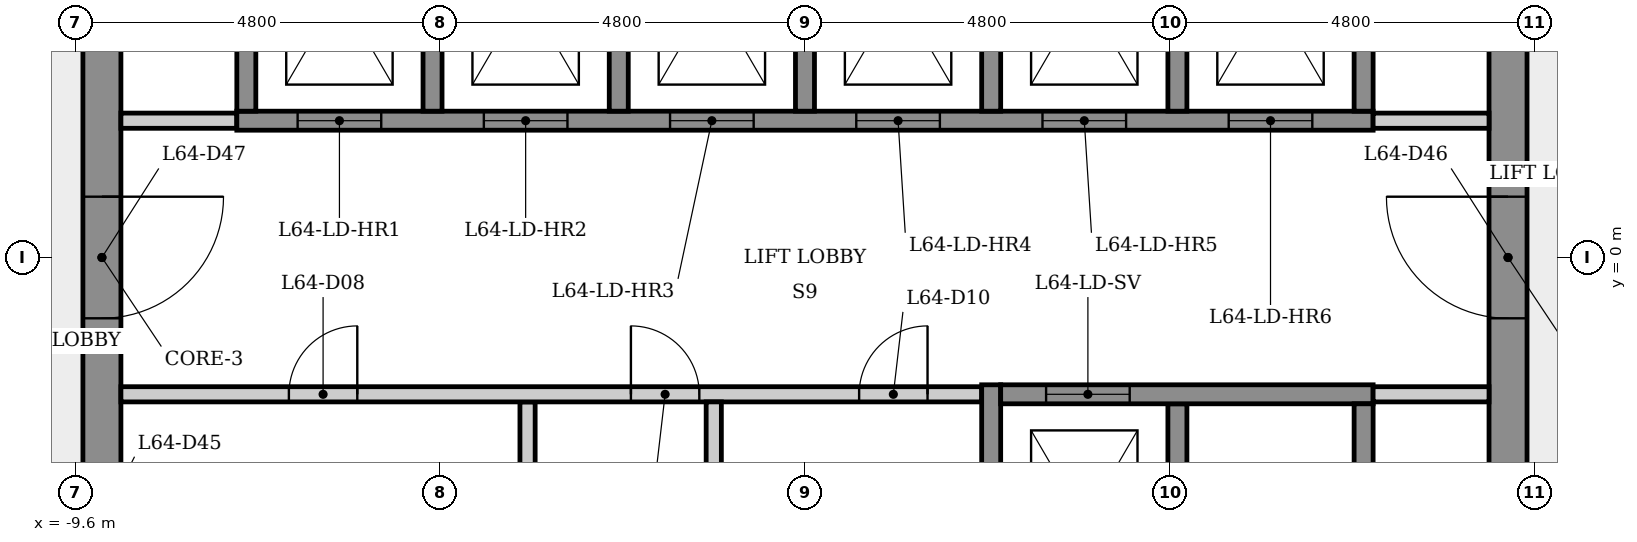
"""IFC4 building model, lengths in metres.
Left out: names, types, materials, properties, quantities, classifications, styles, units other than length and angle.
Written with IfcOpenShell. Run it as: python <this file> out.ifc"""

import sys

from ifc_helpers import new_model, si_unit, direction, frame, frame_2d, origin, place, context, subcontext, project, spatial, rectangle, extrude, element, fill, save


model = new_model("IFC4")
c1 = context("Model", 3, precision=1e-05, world=origin(), true_north=direction((0.0, 1.0)))
c2 = subcontext(c1, "Body", "Model", "MODEL_VIEW")
j1 = project(units=[si_unit("LENGTHUNIT", "METRE"), si_unit("PLANEANGLEUNIT", "RADIAN")], contexts=[c1])
p1 = place(None, origin())
s1 = spatial("IfcSite", under=j1, at=p1, CompositionType="ELEMENT")
p2 = place(p1, origin())
s2 = spatial("IfcBuilding", under=s1, at=p2, CompositionType="ELEMENT")
p3 = place(p2, frame((0.0, 0.0, 239.3)))
s3 = spatial("IfcBuildingStorey", under=s2, at=p3, CompositionType="ELEMENT", Elevation=239.3)
p4 = place(p3, frame((9.25, -5.485, 0.0), z_axis=(0.0, 0.0, 1.0), x_axis=(0.0, 1.0, 0.0)))
e1 = element("IfcWall", 1, at=p4, inside=s3, PredefinedType="SHEAR", context=c2, shape_type="SweptSolid", body=[
    extrude(rectangle(XDim=10.97, YDim=0.5, at=frame_2d((5.485, 0.0))), origin(), (0.0, 0.0, 1.0), 3.4),
])
p5 = place(p4, frame((4.685, 0.0, 0.0)))
e2 = element("IfcOpeningElement", 2, at=p5, cuts=e1, PredefinedType="OPENING", context=c2, shape_type="SweptSolid", body=[
    extrude(rectangle(XDim=1.6, YDim=2.1, at=frame_2d((0.8, 1.05))), frame((0.0, 0.26, 0.0), z_axis=(0.0, -1.0, 0.0), x_axis=(1.0, 0.0, 0.0)), (0.0, 0.0, 1.0), 0.52),
])
p6 = place(p3, frame((-9.25, 5.485, 0.0), z_axis=(0.0, 0.0, 1.0), x_axis=(0.0, -1.0, 0.0)))
e3 = element("IfcWall", 3, at=p6, inside=s3, PredefinedType="SHEAR", context=c2, shape_type="SweptSolid", body=[
    extrude(rectangle(XDim=10.97, YDim=0.5, at=frame_2d((5.485, 0.0))), origin(), (0.0, 0.0, 1.0), 3.4),
])
p7 = place(p6, frame((8.51, 0.0, 0.0)))
e4 = element("IfcOpeningElement", 4, at=p7, cuts=e3, PredefinedType="OPENING", context=c2, shape_type="SweptSolid", body=[
    extrude(rectangle(XDim=0.9, YDim=2.1, at=frame_2d((0.45, 1.05))), frame((0.0, 0.26, 0.0), z_axis=(0.0, -1.0, 0.0), x_axis=(1.0, 0.0, 0.0)), (0.0, 0.0, 1.0), 0.52),
])
p8 = place(p6, frame((4.685, 0.0, 0.0)))
e5 = element("IfcOpeningElement", 5, at=p8, cuts=e3, PredefinedType="OPENING", context=c2, shape_type="SweptSolid", body=[
    extrude(rectangle(XDim=1.6, YDim=2.1, at=frame_2d((0.8, 1.05))), frame((0.0, 0.26, 0.0), z_axis=(0.0, -1.0, 0.0), x_axis=(1.0, 0.0, 0.0)), (0.0, 0.0, 1.0), 0.52),
])
p9 = place(p3, frame((-9.0, 1.8, 0.0), z_axis=(0.0, 0.0, 1.0), x_axis=(1.0, 0.0, 0.0)))
e6 = element("IfcWall", 6, at=p9, inside=s3, PredefinedType="PARTITIONING", context=c2, shape_type="SweptSolid", body=[
    extrude(rectangle(XDim=1.525, YDim=0.2, at=frame_2d((0.763, 0.0))), origin(), (0.0, 0.0, 1.0), 3.05),
])
p10 = place(p3, frame((-7.475, 1.8, 0.0), z_axis=(0.0, 0.0, 1.0), x_axis=(1.0, 0.0, 0.0)))
e7 = element("IfcWall", 7, at=p10, inside=s3, PredefinedType="SHEAR", context=c2, shape_type="SweptSolid", body=[
    extrude(rectangle(XDim=14.95, YDim=0.25, at=frame_2d((7.475, 0.0))), origin(), (0.0, 0.0, 1.0), 3.05),
])
p11 = place(p10, frame((0.8, 0.0, 0.0)))
e8 = element("IfcOpeningElement", 8, at=p11, cuts=e7, PredefinedType="OPENING", context=c2, shape_type="SweptSolid", body=[
    extrude(rectangle(XDim=1.1, YDim=2.1, at=frame_2d((0.55, 1.05))), frame((0.0, 0.135, 0.0), z_axis=(0.0, -1.0, 0.0), x_axis=(1.0, 0.0, 0.0)), (0.0, 0.0, 1.0), 0.27),
])
p12 = place(p10, frame((3.25, 0.0, 0.0)))
e9 = element("IfcOpeningElement", 9, at=p12, cuts=e7, PredefinedType="OPENING", context=c2, shape_type="SweptSolid", body=[
    extrude(rectangle(XDim=1.1, YDim=2.1, at=frame_2d((0.55, 1.05))), frame((0.0, 0.135, 0.0), z_axis=(0.0, -1.0, 0.0), x_axis=(1.0, 0.0, 0.0)), (0.0, 0.0, 1.0), 0.27),
])
p13 = place(p10, frame((5.7, 0.0, 0.0)))
e10 = element("IfcOpeningElement", 10, at=p13, cuts=e7, PredefinedType="OPENING", context=c2, shape_type="SweptSolid", body=[
    extrude(rectangle(XDim=1.1, YDim=2.1, at=frame_2d((0.55, 1.05))), frame((0.0, 0.135, 0.0), z_axis=(0.0, -1.0, 0.0), x_axis=(1.0, 0.0, 0.0)), (0.0, 0.0, 1.0), 0.27),
])
p14 = place(p10, frame((8.15, 0.0, 0.0)))
e11 = element("IfcOpeningElement", 11, at=p14, cuts=e7, PredefinedType="OPENING", context=c2, shape_type="SweptSolid", body=[
    extrude(rectangle(XDim=1.1, YDim=2.1, at=frame_2d((0.55, 1.05))), frame((0.0, 0.135, 0.0), z_axis=(0.0, -1.0, 0.0), x_axis=(1.0, 0.0, 0.0)), (0.0, 0.0, 1.0), 0.27),
])
p15 = place(p10, frame((10.6, 0.0, 0.0)))
e12 = element("IfcOpeningElement", 12, at=p15, cuts=e7, PredefinedType="OPENING", context=c2, shape_type="SweptSolid", body=[
    extrude(rectangle(XDim=1.1, YDim=2.1, at=frame_2d((0.55, 1.05))), frame((0.0, 0.135, 0.0), z_axis=(0.0, -1.0, 0.0), x_axis=(1.0, 0.0, 0.0)), (0.0, 0.0, 1.0), 0.27),
])
p16 = place(p10, frame((13.05, 0.0, 0.0)))
e13 = element("IfcOpeningElement", 13, at=p16, cuts=e7, PredefinedType="OPENING", context=c2, shape_type="SweptSolid", body=[
    extrude(rectangle(XDim=1.1, YDim=2.1, at=frame_2d((0.55, 1.05))), frame((0.0, 0.135, 0.0), z_axis=(0.0, -1.0, 0.0), x_axis=(1.0, 0.0, 0.0)), (0.0, 0.0, 1.0), 0.27),
])
p17 = place(p3, frame((-7.35, 1.925, 0.0), z_axis=(0.0, 0.0, 1.0), x_axis=(0.0, 1.0, 0.0)))
e14 = element("IfcWall", 14, at=p17, inside=s3, PredefinedType="SHEAR", context=c2, shape_type="SweptSolid", body=[
    extrude(rectangle(XDim=3.35, YDim=0.25, at=frame_2d((1.675, 0.0))), origin(), (0.0, 0.0, 1.0), 3.05),
])
p18 = place(p3, frame((-4.9, 5.025, 0.0), z_axis=(0.0, 0.0, 1.0), x_axis=(0.0, -1.0, 0.0)))
e15 = element("IfcWall", 15, at=p18, inside=s3, PredefinedType="SHEAR", context=c2, shape_type="SweptSolid", body=[
    extrude(rectangle(XDim=3.1, YDim=0.25, at=frame_2d((1.55, 0.0))), origin(), (0.0, 0.0, 1.0), 3.4),
])
p19 = place(p3, frame((-3.65, -1.9, 0.0), z_axis=(0.0, 0.0, 1.0), x_axis=(0.0, -1.0, 0.0)))
e16 = element("IfcWall", 16, at=p19, inside=s3, PredefinedType="PARTITIONING", context=c2, shape_type="SweptSolid", body=[
    extrude(rectangle(XDim=3.15, YDim=0.2, at=frame_2d((1.575, 0.0))), origin(), (0.0, 0.0, 1.0), 3.05),
])
p20 = place(p3, frame((-9.0, -1.8, 0.0), z_axis=(0.0, 0.0, 1.0), x_axis=(1.0, 0.0, 0.0)))
e17 = element("IfcWall", 17, at=p20, inside=s3, PredefinedType="PARTITIONING", context=c2, shape_type="SweptSolid", body=[
    extrude(rectangle(XDim=11.325, YDim=0.2, at=frame_2d((5.663, 0.0))), origin(), (0.0, 0.0, 1.0), 3.05),
])
p21 = place(p20, frame((2.21, 0.0, 0.0)))
e18 = element("IfcOpeningElement", 18, at=p21, cuts=e17, PredefinedType="OPENING", context=c2, shape_type="SweptSolid", body=[
    extrude(rectangle(XDim=0.9, YDim=2.1, at=frame_2d((0.45, 1.05))), frame((0.0, 0.11, 0.0), z_axis=(0.0, -1.0, 0.0), x_axis=(1.0, 0.0, 0.0)), (0.0, 0.0, 1.0), 0.22),
])
p22 = place(p20, frame((6.71, 0.0, 0.0)))
e19 = element("IfcOpeningElement", 19, at=p22, cuts=e17, PredefinedType="OPENING", context=c2, shape_type="SweptSolid", body=[
    extrude(rectangle(XDim=0.9, YDim=2.1, at=frame_2d((0.45, 1.05))), frame((0.0, 0.11, 0.0), z_axis=(0.0, -1.0, 0.0), x_axis=(1.0, 0.0, 0.0)), (0.0, 0.0, 1.0), 0.22),
])
p23 = place(p20, frame((9.713, 0.0, 0.0)))
e20 = element("IfcOpeningElement", 20, at=p23, cuts=e17, PredefinedType="OPENING", context=c2, shape_type="SweptSolid", body=[
    extrude(rectangle(XDim=0.9, YDim=2.1, at=frame_2d((0.45, 1.05))), frame((0.0, 0.11, 0.0), z_axis=(0.0, -1.0, 0.0), x_axis=(1.0, 0.0, 0.0)), (0.0, 0.0, 1.0), 0.22),
])
p24 = place(p3, frame((-2.45, 5.025, 0.0), z_axis=(0.0, 0.0, 1.0), x_axis=(0.0, -1.0, 0.0)))
e21 = element("IfcWall", 21, at=p24, inside=s3, PredefinedType="SHEAR", context=c2, shape_type="SweptSolid", body=[
    extrude(rectangle(XDim=3.1, YDim=0.25, at=frame_2d((1.55, 0.0))), origin(), (0.0, 0.0, 1.0), 3.4),
])
p25 = place(p3, frame((-1.2, -1.9, 0.0), z_axis=(0.0, 0.0, 1.0), x_axis=(0.0, -1.0, 0.0)))
e22 = element("IfcWall", 22, at=p25, inside=s3, PredefinedType="PARTITIONING", context=c2, shape_type="SweptSolid", body=[
    extrude(rectangle(XDim=3.15, YDim=0.2, at=frame_2d((1.575, 0.0))), origin(), (0.0, 0.0, 1.0), 3.05),
])
p26 = place(p3, frame((0.0, 5.025, 0.0), z_axis=(0.0, 0.0, 1.0), x_axis=(0.0, -1.0, 0.0)))
e23 = element("IfcWall", 23, at=p26, inside=s3, PredefinedType="SHEAR", context=c2, shape_type="SweptSolid", body=[
    extrude(rectangle(XDim=3.1, YDim=0.25, at=frame_2d((1.55, 0.0))), origin(), (0.0, 0.0, 1.0), 3.4),
])
p27 = place(p3, frame((2.45, -5.275, 0.0), z_axis=(0.0, 0.0, 1.0), x_axis=(0.0, 1.0, 0.0)))
e24 = element("IfcWall", 24, at=p27, inside=s3, PredefinedType="SHEAR", context=c2, shape_type="SweptSolid", body=[
    extrude(rectangle(XDim=3.6, YDim=0.25, at=frame_2d((1.8, 0.0))), origin(), (0.0, 0.0, 1.0), 3.05),
])
for number, where, z_axis, x_axis in (
    (25, (2.45, 5.025, 0.0), (0.0, 0.0, 1.0), (0.0, -1.0, 0.0)),
    (26, (4.9, -1.925, 0.0), (0.0, 0.0, 1.0), (0.0, -1.0, 0.0)),
    (27, (4.9, 5.025, 0.0), (0.0, 0.0, 1.0), (0.0, -1.0, 0.0)),
):
    element("IfcWall", number, at=place(p3, frame(where, z_axis=z_axis, x_axis=x_axis)), inside=s3, PredefinedType="SHEAR", context=c2, shape_type="SweptSolid", body=[
        extrude(rectangle(XDim=3.1, YDim=0.25, at=frame_2d((1.55, 0.0))), origin(), (0.0, 0.0, 1.0), 3.4),
    ])
p28 = place(p3, frame((2.575, -1.8, 0.0), z_axis=(0.0, 0.0, 1.0), x_axis=(1.0, 0.0, 0.0)))
e28 = element("IfcWall", 28, at=p28, inside=s3, PredefinedType="SHEAR", context=c2, shape_type="SweptSolid", body=[
    extrude(rectangle(XDim=4.9, YDim=0.25, at=frame_2d((2.45, 0.0))), origin(), (0.0, 0.0, 1.0), 3.05),
])
p29 = place(p28, frame((0.597, 0.0, 0.0)))
e29 = element("IfcOpeningElement", 29, at=p29, cuts=e28, PredefinedType="OPENING", context=c2, shape_type="SweptSolid", body=[
    extrude(rectangle(XDim=1.1, YDim=2.1, at=frame_2d((0.55, 1.05))), frame((0.0, 0.135, 0.0), z_axis=(0.0, -1.0, 0.0), x_axis=(1.0, 0.0, 0.0)), (0.0, 0.0, 1.0), 0.27),
])
p30 = place(p3, frame((7.475, 1.8, 0.0), z_axis=(0.0, 0.0, 1.0), x_axis=(1.0, 0.0, 0.0)))
e30 = element("IfcWall", 30, at=p30, inside=s3, PredefinedType="PARTITIONING", context=c2, shape_type="SweptSolid", body=[
    extrude(rectangle(XDim=1.525, YDim=0.2, at=frame_2d((0.763, 0.0))), origin(), (0.0, 0.0, 1.0), 3.05),
])
for number, where, z_axis, x_axis in (
    (31, (7.35, -1.925, 0.0), (0.0, 0.0, 1.0), (0.0, -1.0, 0.0)),
    (32, (7.35, 5.025, 0.0), (0.0, 0.0, 1.0), (0.0, -1.0, 0.0)),
):
    element("IfcWall", number, at=place(p3, frame(where, z_axis=z_axis, x_axis=x_axis)), inside=s3, PredefinedType="SHEAR", context=c2, shape_type="SweptSolid", body=[
        extrude(rectangle(XDim=3.1, YDim=0.25, at=frame_2d((1.55, 0.0))), origin(), (0.0, 0.0, 1.0), 3.4),
    ])
p31 = place(p3, frame((9.0, -1.8, 0.0), z_axis=(0.0, 0.0, 1.0), x_axis=(-1.0, 0.0, 0.0)))
e33 = element("IfcWall", 33, at=p31, inside=s3, PredefinedType="PARTITIONING", context=c2, shape_type="SweptSolid", body=[
    extrude(rectangle(XDim=1.525, YDim=0.2, at=frame_2d((0.763, 0.0))), origin(), (0.0, 0.0, 1.0), 3.05),
])
p32 = place(p11, origin())
e34 = element("IfcDoor", 34, at=p32, inside=s3, OperationType="SLIDING_TO_LEFT", PredefinedType="DOOR", context=c2, shape_type="SweptSolid", body=[
    extrude(rectangle(XDim=1.1, YDim=2.1, at=frame_2d((0.55, 1.05))), frame((0.0, 0.025, 0.0), z_axis=(0.0, -1.0, 0.0), x_axis=(1.0, 0.0, 0.0)), (0.0, 0.0, 1.0), 0.05),
])
fill(e8, e34)
p33 = place(p12, origin())
e35 = element("IfcDoor", 35, at=p33, inside=s3, OperationType="SLIDING_TO_LEFT", PredefinedType="DOOR", context=c2, shape_type="SweptSolid", body=[
    extrude(rectangle(XDim=1.1, YDim=2.1, at=frame_2d((0.55, 1.05))), frame((0.0, 0.025, 0.0), z_axis=(0.0, -1.0, 0.0), x_axis=(1.0, 0.0, 0.0)), (0.0, 0.0, 1.0), 0.05),
])
fill(e9, e35)
p34 = place(p13, origin())
e36 = element("IfcDoor", 36, at=p34, inside=s3, OperationType="SLIDING_TO_LEFT", PredefinedType="DOOR", context=c2, shape_type="SweptSolid", body=[
    extrude(rectangle(XDim=1.1, YDim=2.1, at=frame_2d((0.55, 1.05))), frame((0.0, 0.025, 0.0), z_axis=(0.0, -1.0, 0.0), x_axis=(1.0, 0.0, 0.0)), (0.0, 0.0, 1.0), 0.05),
])
fill(e10, e36)
p35 = place(p14, origin())
e37 = element("IfcDoor", 37, at=p35, inside=s3, OperationType="SLIDING_TO_LEFT", PredefinedType="DOOR", context=c2, shape_type="SweptSolid", body=[
    extrude(rectangle(XDim=1.1, YDim=2.1, at=frame_2d((0.55, 1.05))), frame((0.0, 0.025, 0.0), z_axis=(0.0, -1.0, 0.0), x_axis=(1.0, 0.0, 0.0)), (0.0, 0.0, 1.0), 0.05),
])
fill(e11, e37)
p36 = place(p15, origin())
e38 = element("IfcDoor", 38, at=p36, inside=s3, OperationType="SLIDING_TO_LEFT", PredefinedType="DOOR", context=c2, shape_type="SweptSolid", body=[
    extrude(rectangle(XDim=1.1, YDim=2.1, at=frame_2d((0.55, 1.05))), frame((0.0, 0.025, 0.0), z_axis=(0.0, -1.0, 0.0), x_axis=(1.0, 0.0, 0.0)), (0.0, 0.0, 1.0), 0.05),
])
fill(e12, e38)
p37 = place(p16, origin())
e39 = element("IfcDoor", 39, at=p37, inside=s3, OperationType="SLIDING_TO_LEFT", PredefinedType="DOOR", context=c2, shape_type="SweptSolid", body=[
    extrude(rectangle(XDim=1.1, YDim=2.1, at=frame_2d((0.55, 1.05))), frame((0.0, 0.025, 0.0), z_axis=(0.0, -1.0, 0.0), x_axis=(1.0, 0.0, 0.0)), (0.0, 0.0, 1.0), 0.05),
])
fill(e13, e39)
p38 = place(p29, origin())
e40 = element("IfcDoor", 40, at=p38, inside=s3, OperationType="SLIDING_TO_LEFT", PredefinedType="DOOR", context=c2, shape_type="SweptSolid", body=[
    extrude(rectangle(XDim=1.1, YDim=2.1, at=frame_2d((0.55, 1.05))), frame((0.0, 0.025, 0.0), z_axis=(0.0, -1.0, 0.0), x_axis=(1.0, 0.0, 0.0)), (0.0, 0.0, 1.0), 0.05),
])
fill(e29, e40)
p39 = place(p21, origin())
e41 = element("IfcDoor", 41, at=p39, inside=s3, OperationType="SINGLE_SWING_RIGHT", PredefinedType="DOOR", context=c2, shape_type="SweptSolid", body=[
    extrude(rectangle(XDim=0.9, YDim=2.1, at=frame_2d((0.45, 1.05))), frame((0.0, 0.025, 0.0), z_axis=(0.0, -1.0, 0.0), x_axis=(1.0, 0.0, 0.0)), (0.0, 0.0, 1.0), 0.05),
])
fill(e18, e41)
p40 = place(p22, origin())
e42 = element("IfcDoor", 42, at=p40, inside=s3, OperationType="SINGLE_SWING_LEFT", PredefinedType="DOOR", context=c2, shape_type="SweptSolid", body=[
    extrude(rectangle(XDim=0.9, YDim=2.1, at=frame_2d((0.45, 1.05))), frame((0.0, 0.025, 0.0), z_axis=(0.0, -1.0, 0.0), x_axis=(1.0, 0.0, 0.0)), (0.0, 0.0, 1.0), 0.05),
])
fill(e19, e42)
p41 = place(p23, origin())
e43 = element("IfcDoor", 43, at=p41, inside=s3, OperationType="SINGLE_SWING_RIGHT", PredefinedType="DOOR", context=c2, shape_type="SweptSolid", body=[
    extrude(rectangle(XDim=0.9, YDim=2.1, at=frame_2d((0.45, 1.05))), frame((0.0, 0.025, 0.0), z_axis=(0.0, -1.0, 0.0), x_axis=(1.0, 0.0, 0.0)), (0.0, 0.0, 1.0), 0.05),
])
fill(e20, e43)
p42 = place(p5, origin())
e44 = element("IfcDoor", 44, at=p42, inside=s3, OperationType="SINGLE_SWING_RIGHT", PredefinedType="DOOR", context=c2, shape_type="SweptSolid", body=[
    extrude(rectangle(XDim=1.6, YDim=2.1, at=frame_2d((0.8, 1.05))), frame((0.0, 0.025, 0.0), z_axis=(0.0, -1.0, 0.0), x_axis=(1.0, 0.0, 0.0)), (0.0, 0.0, 1.0), 0.05),
])
fill(e2, e44)
p43 = place(p8, origin())
e45 = element("IfcDoor", 45, at=p43, inside=s3, OperationType="SINGLE_SWING_LEFT", PredefinedType="DOOR", context=c2, shape_type="SweptSolid", body=[
    extrude(rectangle(XDim=1.6, YDim=2.1, at=frame_2d((0.8, 1.05))), frame((0.0, 0.025, 0.0), z_axis=(0.0, -1.0, 0.0), x_axis=(1.0, 0.0, 0.0)), (0.0, 0.0, 1.0), 0.05),
])
fill(e5, e45)
save(model, sys.argv[1])
